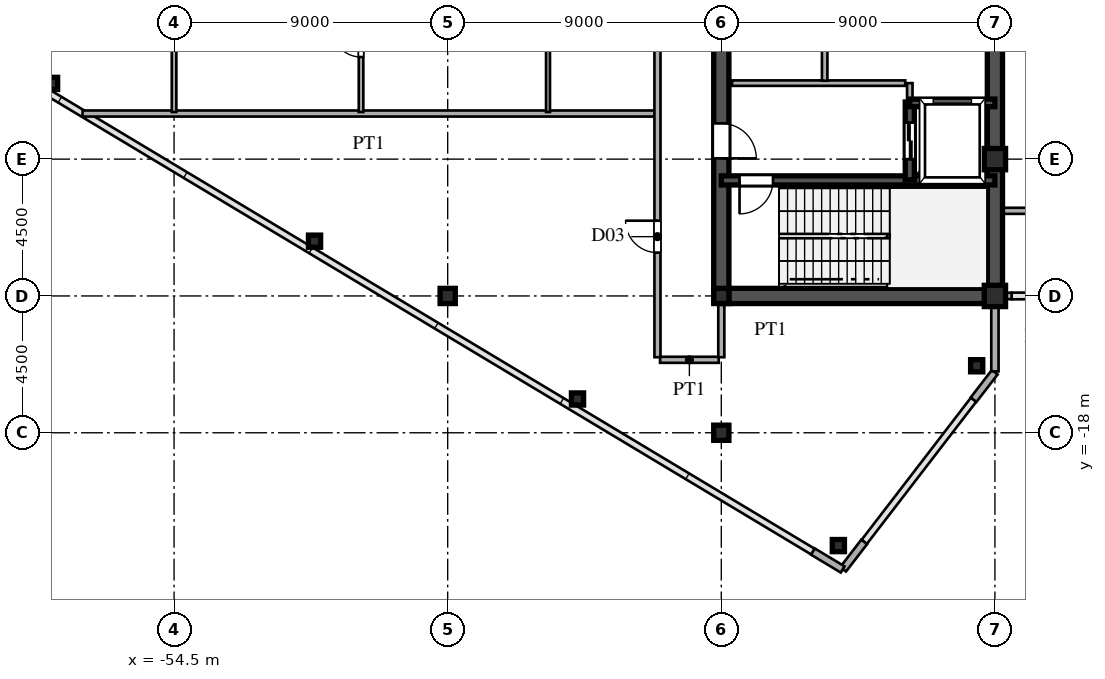
"""IFC4 building model, lengths in metres.
Left out: names, types, materials, properties, quantities, classifications, styles, units other than length and angle.
Written with IfcOpenShell. Run it as: python <this file> out.ifc"""

import sys

from ifc_helpers import new_model, si_unit, direction, frame, frame_2d, origin, origin_2d, place, context, subcontext, project, spatial, rectangle, hollow_rectangle, i_section, extrude, source, transform, mapped, element, fill, save


model = new_model("IFC4")
c1 = context("Model", 3, precision=1e-05, world=origin(), true_north=direction((0.0, 1.0)))
c2 = subcontext(c1, "Body", "Model", "MODEL_VIEW")
j1 = project(units=[si_unit("LENGTHUNIT", "METRE"), si_unit("PLANEANGLEUNIT", "RADIAN")], contexts=[c1])
p1 = place(None, origin())
s1 = spatial("IfcSite", under=j1, at=p1, CompositionType="ELEMENT")
p2 = place(p1, origin())
s2 = spatial("IfcBuilding", under=s1, at=p2, CompositionType="ELEMENT")
p3 = place(p2, frame((0.0, 0.0, 229.8)))
s3 = spatial("IfcBuildingStorey", under=s2, at=p3, CompositionType="ELEMENT", Elevation=229.8)
m1 = source(origin(), c2, "Body", "SweptSolid", [
    extrude(hollow_rectangle(XDim=0.7, YDim=0.7, WallThickness=0.03, at=origin_2d()), origin(), (0.0, 0.0, 1.0), 4.8),
])
for number, where, z_axis, x_axis in (
    (1, (-27.5, -13.5, 0.0), (0.0, 0.0, 1.0), (1.0, 0.0, 0.0)),
    (2, (-27.5, -9.0, 0.0), (0.0, 0.0, 1.0), (1.0, 0.0, 0.0)),
):
    element("IfcColumn", number, at=place(p3, frame(where, z_axis=z_axis, x_axis=x_axis)), inside=s3, PredefinedType="COLUMN", context=c2, shape_type="MappedRepresentation", body=[
        mapped(m1, transform((0.0, 0.0, 0.0), scale=1.0)),
    ])
m2 = source(origin(), c2, "Body", "SweptSolid", [
    extrude(i_section(OverallWidth=0.5, OverallDepth=0.5, WebThickness=0.02, FlangeThickness=0.032, at=origin_2d()), origin(), (0.0, 0.0, 1.0), 4.8),
])
for number, where, z_axis, x_axis in (
    (3, (-36.5, -18.0, 0.0), (0.0, 0.0, 1.0), (1.0, 0.0, 0.0)),
    (4, (-36.5, -13.5, 0.0), (0.0, 0.0, 1.0), (1.0, 0.0, 0.0)),
    (5, (-45.5, -13.5, 0.0), (0.0, 0.0, 1.0), (1.0, 0.0, 0.0)),
):
    element("IfcColumn", number, at=place(p3, frame(where, z_axis=z_axis, x_axis=x_axis)), inside=s3, PredefinedType="COLUMN", context=c2, shape_type="MappedRepresentation", body=[
        mapped(m2, transform((0.0, 0.0, 0.0), scale=1.0)),
    ])
m3 = source(origin(), c2, "Body", "SweptSolid", [
    extrude(hollow_rectangle(XDim=0.4, YDim=0.4, WallThickness=0.016, at=origin_2d()), origin(), (0.0, 0.0, 1.0), 4.8),
])
for number, where, z_axis, x_axis in (
    (6, (-28.1, -15.796, 0.0), (0.0, 0.0, 1.0), (1.0, 0.0, 0.0)),
    (7, (-32.65, -21.71, 0.0), (0.0, 0.0, 1.0), (1.0, 0.0, 0.0)),
    (8, (-41.23, -16.889, 0.0), (0.0, 0.0, 1.0), (1.0, 0.0, 0.0)),
    (9, (-49.88, -11.699, 0.0), (0.0, 0.0, 1.0), (1.0, 0.0, 0.0)),
    (10, (-58.53, -6.509, 0.0), (0.0, 0.0, 1.0), (1.0, 0.0, 0.0)),
):
    element("IfcColumn", number, at=place(p3, frame(where, z_axis=z_axis, x_axis=x_axis)), inside=s3, PredefinedType="COLUMN", context=c2, shape_type="MappedRepresentation", body=[
        mapped(m3, transform((0.0, 0.0, 0.0), scale=1.0)),
    ])
p4 = place(p3, frame((-27.5, -15.98, 0.0), z_axis=(0.0, 0.0, 1.0), x_axis=(0.0, 1.0, 0.0)))
e11 = element("IfcWall", 11, at=p4, inside=s3, PredefinedType="SOLIDWALL", context=c2, shape_type="SweptSolid", body=[
    extrude(rectangle(XDim=1.605, YDim=0.24, at=frame_2d((0.803, 0.0))), origin(), (0.0, 0.0, 1.0), 4.54),
])
p5 = place(p3, frame((-27.5, -14.375, 0.0), z_axis=(0.0, 0.0, 1.0), x_axis=(0.0, 1.0, 0.0)))
e12 = element("IfcWall", 12, at=p5, inside=s3, PredefinedType="SOLIDWALL", context=c2, shape_type="SweptSolid", body=[
    extrude(rectangle(XDim=0.62, YDim=0.24, at=frame_2d((0.31, 0.0))), origin(), (0.0, 0.0, 1.0), 4.04),
])
for number, where, z_axis, x_axis in (
    (13, (-33.486, -21.908, 0.0), (0.0, 0.0, 1.0), (0.857, -0.515, 0.0)),
    (14, (-32.494, -22.492, 0.0), (0.0, 0.0, 1.0), (0.61, 0.793, 0.0)),
    (15, (-28.201, -16.912, 0.0), (0.0, 0.0, 1.0), (0.61, 0.793, 0.0)),
):
    element("IfcWall", number, at=place(p3, frame(where, z_axis=z_axis, x_axis=x_axis)), inside=s3, PredefinedType="SOLIDWALL", context=c2, shape_type="SweptSolid", body=[
        extrude(rectangle(XDim=1.14, YDim=0.24, at=frame_2d((0.57, 0.0))), origin(), (0.0, 0.0, 1.0), 4.54),
    ])
p6 = place(p3, frame((-27.49, -13.5, 0.0), z_axis=(0.0, 0.0, 1.0), x_axis=(1.0, 0.0, 0.0)))
e16 = element("IfcWall", 16, at=p6, inside=s3, PredefinedType="SOLIDWALL", context=c2, shape_type="SweptSolid", body=[
    extrude(rectangle(XDim=0.54, YDim=0.21, at=frame_2d((0.27, 0.0))), origin(), (0.0, 0.0, 1.0), 2.54),
])
p7 = place(p3, frame((-27.5, -13.5, 0.0), z_axis=(0.0, 0.0, 1.0), x_axis=(0.0, 1.0, 0.0)))
e17 = element("IfcWall", 17, at=p7, inside=s3, PredefinedType="SHEAR", context=c2, shape_type="SweptSolid", body=[
    extrude(rectangle(XDim=12.2, YDim=0.5, at=frame_2d((6.1, 0.0))), origin(), (0.0, 0.0, 1.0), 4.54),
])
p8 = place(p3, frame((-36.5, -13.5, 0.0), z_axis=(0.0, 0.0, 1.0), x_axis=(1.0, 0.0, 0.0)))
e18 = element("IfcWall", 18, at=p8, inside=s3, PredefinedType="SHEAR", context=c2, shape_type="SweptSolid", body=[
    extrude(rectangle(XDim=9.0, YDim=0.5, at=frame_2d((4.5, 0.0))), origin(), (0.0, 0.0, 1.0), 4.54),
])
p9 = place(p3, frame((-36.5, -13.65, 0.0), z_axis=(0.0, 0.0, 1.0), x_axis=(0.0, 1.0, 0.0)))
e19 = element("IfcWall", 19, at=p9, inside=s3, PredefinedType="SHEAR", context=c2, shape_type="SweptSolid", body=[
    extrude(rectangle(XDim=7.15, YDim=0.5, at=frame_2d((3.575, 0.0))), origin(), (0.0, 0.0, 1.0), 4.54),
])
p10 = place(p9, frame((4.675, 0.0, 0.0)))
e20 = element("IfcOpeningElement", 20, at=p10, cuts=e19, PredefinedType="OPENING", context=c2, shape_type="SweptSolid", body=[
    extrude(rectangle(XDim=1.15, YDim=2.2, at=frame_2d((0.575, 1.1))), frame((0.0, 0.26, 0.0), z_axis=(0.0, -1.0, 0.0), x_axis=(1.0, 0.0, 0.0)), (0.0, 0.0, 1.0), 0.52),
])
p11 = place(p3, frame((-36.5, -6.5, 0.0), z_axis=(0.0, 0.0, 1.0), x_axis=(0.0, 1.0, 0.0)))
e21 = element("IfcWall", 21, at=p11, inside=s3, PredefinedType="SHEAR", context=c2, shape_type="SweptSolid", body=[
    extrude(rectangle(XDim=5.2, YDim=0.5, at=frame_2d((2.6, 0.0))), origin(), (0.0, 0.0, 1.0), 4.54),
])
p12 = place(p11, frame((2.125, 0.0, 0.0)))
e22 = element("IfcOpeningElement", 22, at=p12, cuts=e21, PredefinedType="OPENING", context=c2, shape_type="SweptSolid", body=[
    extrude(rectangle(XDim=0.95, YDim=2.15, at=frame_2d((0.475, 1.075))), frame((0.0, 0.26, 0.0), z_axis=(0.0, -1.0, 0.0), x_axis=(1.0, 0.0, 0.0)), (0.0, 0.0, 1.0), 0.52),
])
p13 = place(p3, frame((-36.5, -9.7, 0.0), z_axis=(0.0, 0.0, 1.0), x_axis=(1.0, 0.0, 0.0)))
e23 = element("IfcWall", 23, at=p13, inside=s3, PredefinedType="SHEAR", context=c2, shape_type="SweptSolid", body=[
    extrude(rectangle(XDim=9.0, YDim=0.3, at=frame_2d((4.5, 0.0))), origin(), (0.0, 0.0, 1.0), 4.54),
])
p14 = place(p13, frame((0.6, 0.0, 0.0)))
e24 = element("IfcOpeningElement", 24, at=p14, cuts=e23, PredefinedType="OPENING", context=c2, shape_type="SweptSolid", body=[
    extrude(rectangle(XDim=1.1, YDim=2.2, at=frame_2d((0.55, 1.1))), frame((0.0, 0.16, 0.0), z_axis=(0.0, -1.0, 0.0), x_axis=(1.0, 0.0, 0.0)), (0.0, 0.0, 1.0), 0.32),
])
p15 = place(p3, frame((-30.3, -7.15, 0.0), z_axis=(0.0, 0.0, 1.0), x_axis=(1.0, 0.0, 0.0)))
e25 = element("IfcWall", 25, at=p15, inside=s3, PredefinedType="SHEAR", context=c2, shape_type="SweptSolid", body=[
    extrude(rectangle(XDim=2.8, YDim=0.25, at=frame_2d((1.4, 0.0))), origin(), (0.0, 0.0, 1.0), 4.54),
])
p16 = place(p3, frame((-30.3, -9.68, 0.0), z_axis=(0.0, 0.0, 1.0), x_axis=(0.0, 1.0, 0.0)))
e26 = element("IfcWall", 26, at=p16, inside=s3, PredefinedType="SHEAR", context=c2, shape_type="SweptSolid", body=[
    extrude(rectangle(XDim=2.56, YDim=0.3, at=frame_2d((1.28, 0.0))), origin(), (0.0, 0.0, 1.0), 4.54),
])
p17 = place(p16, frame((0.68, 0.0, 0.0)))
e27 = element("IfcOpeningElement", 27, at=p17, cuts=e26, PredefinedType="OPENING", context=c2, shape_type="SweptSolid", body=[
    extrude(rectangle(XDim=1.2, YDim=2.25, at=frame_2d((0.6, 1.125))), frame((0.0, 0.16, 0.0), z_axis=(0.0, -1.0, 0.0), x_axis=(1.0, 0.0, 0.0)), (0.0, 0.0, 1.0), 0.32),
])
p18 = place(p3, frame((-36.15, -6.5, 0.0), z_axis=(0.0, 0.0, 1.0), x_axis=(1.0, 0.0, 0.0)))
e28 = element("IfcWall", 28, at=p18, inside=s3, PredefinedType="PARTITIONING", context=c2, shape_type="SweptSolid", body=[
    extrude(rectangle(XDim=5.7, YDim=0.18, at=frame_2d((2.85, 0.0))), origin(), (0.0, 0.0, 1.0), 4.54),
])
p19 = place(p3, frame((-30.3, -7.12, 0.0), z_axis=(0.0, 0.0, 1.0), x_axis=(0.0, 1.0, 0.0)))
e29 = element("IfcWall", 29, at=p19, inside=s3, PredefinedType="PARTITIONING", context=c2, shape_type="SweptSolid", body=[
    extrude(rectangle(XDim=0.62, YDim=0.18, at=frame_2d((0.31, 0.0))), origin(), (0.0, 0.0, 1.0), 4.54),
])
p20 = place(p3, frame((-33.1, -6.42, 0.0), z_axis=(0.0, 0.0, 1.0), x_axis=(0.0, 1.0, 0.0)))
e30 = element("IfcWall", 30, at=p20, inside=s3, PredefinedType="PARTITIONING", context=c2, shape_type="SweptSolid", body=[
    extrude(rectangle(XDim=5.04, YDim=0.18, at=frame_2d((2.52, 0.0))), origin(), (0.0, 0.0, 1.0), 4.54),
])
p21 = place(p3, frame((-38.515, -15.6, 0.0), z_axis=(0.0, 0.0, 1.0), x_axis=(1.0, 0.0, 0.0)))
e31 = element("IfcWall", 31, at=p21, inside=s3, PredefinedType="PARTITIONING", context=c2, shape_type="SweptSolid", body=[
    extrude(rectangle(XDim=1.93, YDim=0.2, at=frame_2d((0.965, 0.0))), origin(), (0.0, 0.0, 1.0), 4.54),
])
p22 = place(p3, frame((-27.245, -10.7, 0.0), z_axis=(0.0, 0.0, 1.0), x_axis=(1.0, 0.0, 0.0)))
e32 = element("IfcWall", 32, at=p22, inside=s3, PredefinedType="PARTITIONING", context=c2, shape_type="SweptSolid", body=[
    extrude(rectangle(XDim=54.49, YDim=0.2, at=frame_2d((27.245, 0.0))), origin(), (0.0, 0.0, 1.0), 4.54),
])
p23 = place(p22, frame((25.77, 0.0, 0.0)))
e33 = element("IfcOpeningElement", 33, at=p23, cuts=e32, PredefinedType="OPENING", context=c2, shape_type="SweptSolid", body=[
    extrude(rectangle(XDim=1.15, YDim=2.2, at=frame_2d((0.575, 1.1))), frame((0.0, 0.11, 0.0), z_axis=(0.0, -1.0, 0.0), x_axis=(1.0, 0.0, 0.0)), (0.0, 0.0, 1.0), 0.22),
])
p24 = place(p3, frame((-57.51, -7.5, 0.0), z_axis=(0.0, 0.0, 1.0), x_axis=(1.0, 0.0, 0.0)))
e34 = element("IfcWall", 34, at=p24, inside=s3, PredefinedType="PARTITIONING", context=c2, shape_type="SweptSolid", body=[
    extrude(rectangle(XDim=18.83, YDim=0.2, at=frame_2d((9.415, 0.0))), origin(), (0.0, 0.0, 1.0), 4.54),
])
p25 = place(p3, frame((-54.5, -7.45, 0.0), z_axis=(0.0, 0.0, 1.0), x_axis=(0.0, 1.0, 0.0)))
e35 = element("IfcWall", 35, at=p25, inside=s3, PredefinedType="PARTITIONING", context=c2, shape_type="SweptSolid", body=[
    extrude(rectangle(XDim=13.9, YDim=0.15, at=frame_2d((6.95, 0.0))), origin(), (0.0, 0.0, 1.0), 3.94),
])
p26 = place(p25, frame((6.475, 0.0, 0.0)))
e36 = element("IfcOpeningElement", 36, at=p26, cuts=e35, PredefinedType="OPENING", context=c2, shape_type="SweptSolid", body=[
    extrude(rectangle(XDim=0.95, YDim=2.15, at=frame_2d((0.475, 1.075))), frame((0.0, 0.085, 0.0), z_axis=(0.0, -1.0, 0.0), x_axis=(1.0, 0.0, 0.0)), (0.0, 0.0, 1.0), 0.17),
])
p27 = place(p3, frame((-48.35, -7.45, 0.0), z_axis=(0.0, 0.0, 1.0), x_axis=(0.0, 1.0, 0.0)))
e37 = element("IfcWall", 37, at=p27, inside=s3, PredefinedType="PARTITIONING", context=c2, shape_type="SweptSolid", body=[
    extrude(rectangle(XDim=13.9, YDim=0.15, at=frame_2d((6.95, 0.0))), origin(), (0.0, 0.0, 1.0), 4.54),
])
p28 = place(p27, frame((6.475, 0.0, 0.0)))
e38 = element("IfcOpeningElement", 38, at=p28, cuts=e37, PredefinedType="OPENING", context=c2, shape_type="SweptSolid", body=[
    extrude(rectangle(XDim=0.95, YDim=2.15, at=frame_2d((0.475, 1.075))), frame((0.0, 0.085, 0.0), z_axis=(0.0, -1.0, 0.0), x_axis=(1.0, 0.0, 0.0)), (0.0, 0.0, 1.0), 0.17),
])
p29 = place(p27, frame((1.808, 0.0, 0.0)))
e39 = element("IfcOpeningElement", 39, at=p29, cuts=e37, PredefinedType="OPENING", context=c2, shape_type="SweptSolid", body=[
    extrude(rectangle(XDim=0.95, YDim=2.15, at=frame_2d((0.475, 1.075))), frame((0.0, 0.085, 0.0), z_axis=(0.0, -1.0, 0.0), x_axis=(1.0, 0.0, 0.0)), (0.0, 0.0, 1.0), 0.17),
])
p30 = place(p3, frame((-42.2, -7.45, 0.0), z_axis=(0.0, 0.0, 1.0), x_axis=(0.0, 1.0, 0.0)))
e40 = element("IfcWall", 40, at=p30, inside=s3, PredefinedType="PARTITIONING", context=c2, shape_type="SweptSolid", body=[
    extrude(rectangle(XDim=9.233, YDim=0.13, at=frame_2d((4.616, 0.0))), origin(), (0.0, 0.0, 1.0), 4.54),
])
p31 = place(p30, frame((6.475, 0.0, 0.0)))
e41 = element("IfcOpeningElement", 41, at=p31, cuts=e40, PredefinedType="OPENING", context=c2, shape_type="SweptSolid", body=[
    extrude(rectangle(XDim=0.95, YDim=2.15, at=frame_2d((0.475, 1.075))), frame((0.0, 0.075, 0.0), z_axis=(0.0, -1.0, 0.0), x_axis=(1.0, 0.0, 0.0)), (0.0, 0.0, 1.0), 0.15),
])
p32 = place(p3, frame((-38.6, -15.515, 0.0), z_axis=(0.0, 0.0, 1.0), x_axis=(0.0, 1.0, 0.0)))
e42 = element("IfcWall", 42, at=p32, inside=s3, PredefinedType="PARTITIONING", context=c2, shape_type="SweptSolid", body=[
    extrude(rectangle(XDim=31.03, YDim=0.2, at=frame_2d((15.515, 0.0))), origin(), (0.0, 0.0, 1.0), 4.54),
])
p33 = place(p32, frame((3.44, 0.0, 0.0)))
e43 = element("IfcOpeningElement", 43, at=p33, cuts=e42, PredefinedType="OPENING", context=c2, shape_type="SweptSolid", body=[
    extrude(rectangle(XDim=1.05, YDim=2.25, at=frame_2d((0.525, 1.125))), frame((0.0, 0.11, 0.0), z_axis=(0.0, -1.0, 0.0), x_axis=(1.0, 0.0, 0.0)), (0.0, 0.0, 1.0), 0.22),
])
p34 = place(p32, frame((14.28, 0.0, 0.0)))
e44 = element("IfcOpeningElement", 44, at=p34, cuts=e42, PredefinedType="OPENING", context=c2, shape_type="SweptSolid", body=[
    extrude(rectangle(XDim=1.05, YDim=2.25, at=frame_2d((0.525, 1.125))), frame((0.0, 0.11, 0.0), z_axis=(0.0, -1.0, 0.0), x_axis=(1.0, 0.0, 0.0)), (0.0, 0.0, 1.0), 0.22),
])
p35 = place(p32, frame((26.04, 0.0, 0.0)))
e45 = element("IfcOpeningElement", 45, at=p35, cuts=e42, PredefinedType="OPENING", context=c2, shape_type="SweptSolid", body=[
    extrude(rectangle(XDim=1.05, YDim=2.25, at=frame_2d((0.525, 1.125))), frame((0.0, 0.11, 0.0), z_axis=(0.0, -1.0, 0.0), x_axis=(1.0, 0.0, 0.0)), (0.0, 0.0, 1.0), 0.22),
])
p36 = place(p3, frame((-36.5, -15.515, 0.0), z_axis=(0.0, 0.0, 1.0), x_axis=(0.0, 1.0, 0.0)))
e46 = element("IfcWall", 46, at=p36, inside=s3, PredefinedType="PARTITIONING", context=c2, shape_type="SweptSolid", body=[
    extrude(rectangle(XDim=1.76, YDim=0.2, at=frame_2d((0.88, 0.0))), origin(), (0.0, 0.0, 1.0), 3.94),
])
m4 = source(origin(), c2, "Body", "SweptSolid", [
    extrude(rectangle(XDim=1.15, YDim=2.2, at=frame_2d((0.575, 1.1))), frame((0.0, 0.025, 0.0), z_axis=(0.0, -1.0, 0.0), x_axis=(1.0, 0.0, 0.0)), (0.0, 0.0, 1.0), 0.05),
])
p37 = place(p10, frame((1.15, 0.0, 0.0), z_axis=(0.0, 0.0, 1.0), x_axis=(-1.0, 0.0, 0.0)))
e47 = element("IfcDoor", 47, at=p37, inside=s3, OperationType="SINGLE_SWING_LEFT", PredefinedType="DOOR", context=c2, shape_type="MappedRepresentation", body=[
    mapped(m4, transform((0.0, 0.0, 0.0), scale=1.0)),
])
fill(e20, e47)
m5 = source(origin(), c2, "Body", "SweptSolid", [
    extrude(rectangle(XDim=1.1, YDim=2.2, at=frame_2d((0.55, 1.1))), frame((0.0, 0.025, 0.0), z_axis=(0.0, -1.0, 0.0), x_axis=(1.0, 0.0, 0.0)), (0.0, 0.0, 1.0), 0.05),
])
p38 = place(p14, frame((1.1, 0.0, 0.0), z_axis=(0.0, 0.0, 1.0), x_axis=(-1.0, 0.0, 0.0)))
e48 = element("IfcDoor", 48, at=p38, inside=s3, OperationType="SINGLE_SWING_LEFT", PredefinedType="DOOR", context=c2, shape_type="MappedRepresentation", body=[
    mapped(m5, transform((0.0, 0.0, 0.0), scale=1.0)),
])
fill(e24, e48)
m6 = source(origin(), c2, "Body", "SweptSolid", [
    extrude(rectangle(XDim=1.2, YDim=2.25, at=frame_2d((0.6, 1.125))), frame((0.0, 0.025, 0.0), z_axis=(0.0, -1.0, 0.0), x_axis=(1.0, 0.0, 0.0)), (0.0, 0.0, 1.0), 0.05),
])
p39 = place(p17, origin())
e49 = element("IfcDoor", 49, at=p39, inside=s3, OperationType="DOUBLE_DOOR_SLIDING", PredefinedType="DOOR", context=c2, shape_type="MappedRepresentation", body=[
    mapped(m6, transform((0.0, 0.0, 0.0), scale=1.0)),
])
fill(e27, e49)
m7 = source(origin(), c2, "Body", "SweptSolid", [
    extrude(rectangle(XDim=0.95, YDim=2.15, at=frame_2d((0.475, 1.075))), frame((0.0, 0.025, 0.0), z_axis=(0.0, -1.0, 0.0), x_axis=(1.0, 0.0, 0.0)), (0.0, 0.0, 1.0), 0.05),
])
p40 = place(p29, origin())
e50 = element("IfcDoor", 50, at=p40, inside=s3, OperationType="SINGLE_SWING_RIGHT", PredefinedType="DOOR", context=c2, shape_type="MappedRepresentation", body=[
    mapped(m7, transform((0.0, 0.0, 0.0), scale=1.0)),
])
fill(e39, e50)
m8 = source(origin(), c2, "Body", "SweptSolid", [
    extrude(rectangle(XDim=1.05, YDim=2.25, at=frame_2d((0.525, 1.125))), frame((0.0, 0.025, 0.0), z_axis=(0.0, -1.0, 0.0), x_axis=(1.0, 0.0, 0.0)), (0.0, 0.0, 1.0), 0.05),
])
p41 = place(p33, origin())
e51 = element("IfcDoor", 51, at=p41, inside=s3, OperationType="SINGLE_SWING_RIGHT", PredefinedType="DOOR", context=c2, shape_type="MappedRepresentation", body=[
    mapped(m8, transform((0.0, 0.0, 0.0), scale=1.0)),
])
fill(e43, e51)
save(model, sys.argv[1])
